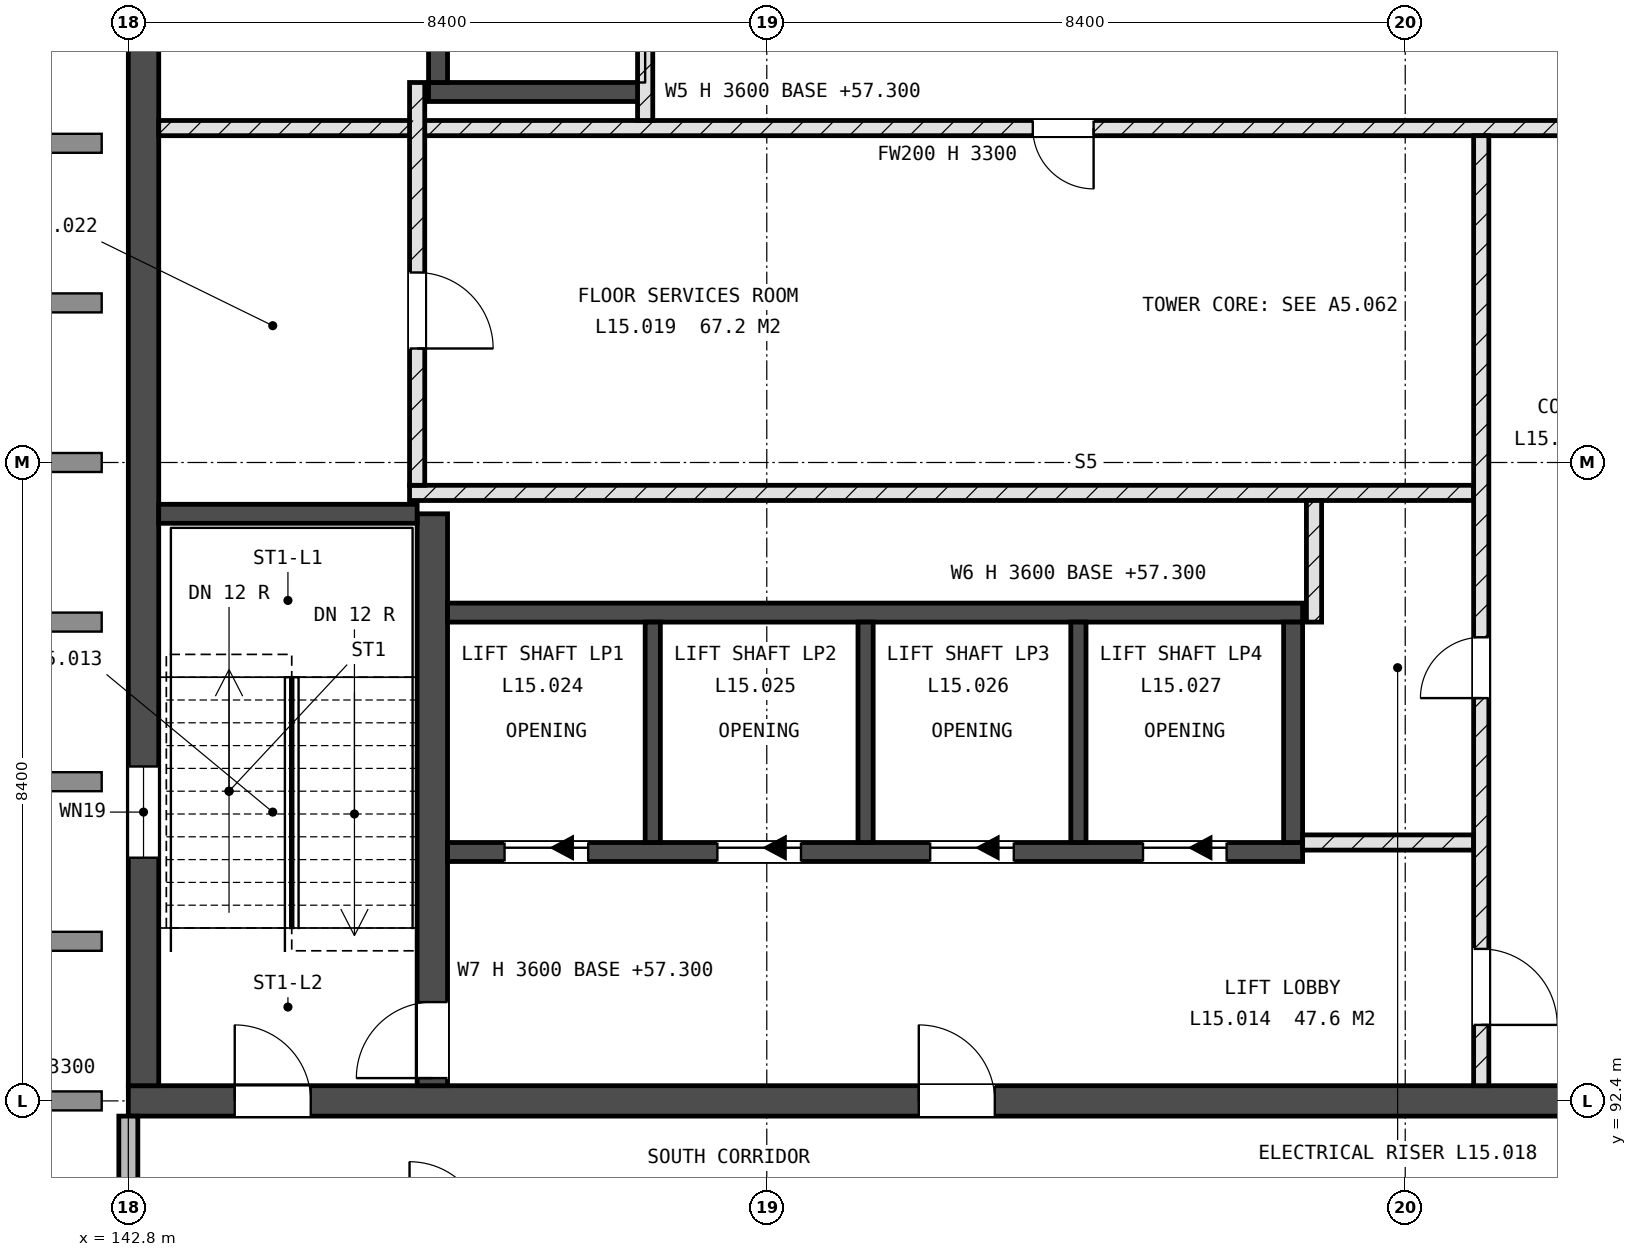
"""IFC4 building model, lengths in metres.
Left out: names, types, materials, properties, quantities, classifications, styles, units other than length and angle.
Written with IfcOpenShell. Run it as: python <this file> out.ifc"""

import sys

from ifc_helpers import new_model, si_unit, direction, frame, frame_2d, origin, place, context, subcontext, project, spatial, rectangle, extrude, element, fill, save


model = new_model("IFC4")
c1 = context("Model", 3, precision=1e-05, world=origin(), true_north=direction((0.0, 1.0)))
c2 = subcontext(c1, "Body", "Model", "MODEL_VIEW")
j1 = project(units=[si_unit("LENGTHUNIT", "METRE"), si_unit("PLANEANGLEUNIT", "RADIAN")], contexts=[c1])
p1 = place(None, origin())
s1 = spatial("IfcSite", under=j1, at=p1, CompositionType="ELEMENT")
p2 = place(p1, origin())
s2 = spatial("IfcBuilding", under=s1, at=p2, CompositionType="ELEMENT")
p3 = place(p2, frame((0.0, 0.0, 57.6)))
s3 = spatial("IfcBuildingStorey", under=s2, at=p3, CompositionType="ELEMENT", Elevation=57.6)
p4 = place(p3, frame((142.8, 92.4, -0.3), z_axis=(0.0, 0.0, 1.0), x_axis=(1.0, 0.0, 0.0)))
e1 = element("IfcWall", 1, at=p4, inside=s3, PredefinedType="SHEAR", context=c2, shape_type="SweptSolid", body=[
    extrude(rectangle(XDim=25.2, YDim=0.4, at=frame_2d((12.6, 0.0))), origin(), (0.0, 0.0, 1.0), 3.6),
])
p5 = place(p4, frame((1.4, 0.0, 0.3)))
e2 = element("IfcOpeningElement", 2, at=p5, cuts=e1, PredefinedType="OPENING", context=c2, shape_type="SweptSolid", body=[
    extrude(rectangle(XDim=1.0, YDim=2.1, at=frame_2d((0.5, 1.05))), frame((0.0, 0.21, 0.0), z_axis=(0.0, -1.0, 0.0), x_axis=(1.0, 0.0, 0.0)), (0.0, 0.0, 1.0), 0.42),
])
p6 = place(p4, frame((19.1, 0.0, 0.3)))
e3 = element("IfcOpeningElement", 3, at=p6, cuts=e1, PredefinedType="OPENING", context=c2, shape_type="SweptSolid", body=[
    extrude(rectangle(XDim=1.0, YDim=2.1, at=frame_2d((0.5, 1.05))), frame((0.0, 0.21, 0.0), z_axis=(0.0, -1.0, 0.0), x_axis=(1.0, 0.0, 0.0)), (0.0, 0.0, 1.0), 0.42),
])
p7 = place(p4, frame((10.4, 0.0, 0.3)))
e4 = element("IfcOpeningElement", 4, at=p7, cuts=e1, PredefinedType="OPENING", context=c2, shape_type="SweptSolid", body=[
    extrude(rectangle(XDim=1.0, YDim=2.1, at=frame_2d((0.5, 1.05))), frame((0.0, 0.21, 0.0), z_axis=(0.0, -1.0, 0.0), x_axis=(1.0, 0.0, 0.0)), (0.0, 0.0, 1.0), 0.42),
])
p8 = place(p3, frame((143.0, 92.6, -0.3), z_axis=(0.0, 0.0, 1.0), x_axis=(0.0, 1.0, 0.0)))
e5 = element("IfcWall", 5, at=p8, inside=s3, PredefinedType="SHEAR", context=c2, shape_type="SweptSolid", body=[
    extrude(rectangle(XDim=16.4, YDim=0.4, at=frame_2d((8.2, 0.0))), origin(), (0.0, 0.0, 1.0), 3.6),
])
p9 = place(p8, frame((3.0, 0.0, 1.9)))
e6 = element("IfcOpeningElement", 6, at=p9, cuts=e5, PredefinedType="OPENING", context=c2, shape_type="SweptSolid", body=[
    extrude(rectangle(XDim=1.2, YDim=0.9, at=frame_2d((0.6, 0.45))), frame((0.0, 0.21, 0.0), z_axis=(0.0, -1.0, 0.0), x_axis=(1.0, 0.0, 0.0)), (0.0, 0.0, 1.0), 0.42),
])
p10 = place(p3, frame((146.8, 92.6, -0.3), z_axis=(0.0, 0.0, 1.0), x_axis=(0.0, 1.0, 0.0)))
e7 = element("IfcWall", 7, at=p10, inside=s3, PredefinedType="SHEAR", context=c2, shape_type="SweptSolid", body=[
    extrude(rectangle(XDim=7.525, YDim=0.4, at=frame_2d((3.762, 0.0))), origin(), (0.0, 0.0, 1.0), 3.6),
])
p11 = place(p10, frame((0.1, 0.0, 0.3)))
e8 = element("IfcOpeningElement", 8, at=p11, cuts=e7, PredefinedType="OPENING", context=c2, shape_type="SweptSolid", body=[
    extrude(rectangle(XDim=1.0, YDim=2.1, at=frame_2d((0.5, 1.05))), frame((0.0, 0.21, 0.0), z_axis=(0.0, -1.0, 0.0), x_axis=(1.0, 0.0, 0.0)), (0.0, 0.0, 1.0), 0.42),
])
p12 = place(p3, frame((143.2, 100.125, -0.3), z_axis=(0.0, 0.0, 1.0), x_axis=(1.0, 0.0, 0.0)))
e9 = element("IfcWall", 9, at=p12, inside=s3, PredefinedType="SHEAR", context=c2, shape_type="SweptSolid", body=[
    extrude(rectangle(XDim=3.4, YDim=0.25, at=frame_2d((1.7, 0.0))), origin(), (0.0, 0.0, 1.0), 3.6),
])
p13 = place(p3, frame((147.0, 95.675, -0.3), z_axis=(0.0, 0.0, 1.0), x_axis=(1.0, 0.0, 0.0)))
e10 = element("IfcWall", 10, at=p13, inside=s3, PredefinedType="SHEAR", context=c2, shape_type="SweptSolid", body=[
    extrude(rectangle(XDim=11.25, YDim=0.25, at=frame_2d((5.625, 0.0))), origin(), (0.0, 0.0, 1.0), 3.6),
])
p14 = place(p13, frame((0.75, 0.0, 0.3)))
e11 = element("IfcOpeningElement", 11, at=p14, cuts=e10, PredefinedType="OPENING", context=c2, shape_type="SweptSolid", body=[
    extrude(rectangle(XDim=1.1, YDim=2.1, at=frame_2d((0.55, 1.05))), frame((0.0, 0.135, 0.0), z_axis=(0.0, -1.0, 0.0), x_axis=(1.0, 0.0, 0.0)), (0.0, 0.0, 1.0), 0.27),
])
p15 = place(p13, frame((3.55, 0.0, 0.3)))
e12 = element("IfcOpeningElement", 12, at=p15, cuts=e10, PredefinedType="OPENING", context=c2, shape_type="SweptSolid", body=[
    extrude(rectangle(XDim=1.1, YDim=2.1, at=frame_2d((0.55, 1.05))), frame((0.0, 0.135, 0.0), z_axis=(0.0, -1.0, 0.0), x_axis=(1.0, 0.0, 0.0)), (0.0, 0.0, 1.0), 0.27),
])
p16 = place(p13, frame((6.35, 0.0, 0.3)))
e13 = element("IfcOpeningElement", 13, at=p16, cuts=e10, PredefinedType="OPENING", context=c2, shape_type="SweptSolid", body=[
    extrude(rectangle(XDim=1.1, YDim=2.1, at=frame_2d((0.55, 1.05))), frame((0.0, 0.135, 0.0), z_axis=(0.0, -1.0, 0.0), x_axis=(1.0, 0.0, 0.0)), (0.0, 0.0, 1.0), 0.27),
])
p17 = place(p13, frame((9.15, 0.0, 0.3)))
e14 = element("IfcOpeningElement", 14, at=p17, cuts=e10, PredefinedType="OPENING", context=c2, shape_type="SweptSolid", body=[
    extrude(rectangle(XDim=1.1, YDim=2.1, at=frame_2d((0.55, 1.05))), frame((0.0, 0.135, 0.0), z_axis=(0.0, -1.0, 0.0), x_axis=(1.0, 0.0, 0.0)), (0.0, 0.0, 1.0), 0.27),
])
p18 = place(p3, frame((147.0, 98.825, -0.3), z_axis=(0.0, 0.0, 1.0), x_axis=(1.0, 0.0, 0.0)))
e15 = element("IfcWall", 15, at=p18, inside=s3, PredefinedType="SHEAR", context=c2, shape_type="SweptSolid", body=[
    extrude(rectangle(XDim=11.25, YDim=0.25, at=frame_2d((5.625, 0.0))), origin(), (0.0, 0.0, 1.0), 3.6),
])
p19 = place(p3, frame((158.125, 95.8, -0.3), z_axis=(0.0, 0.0, 1.0), x_axis=(0.0, 1.0, 0.0)))
e16 = element("IfcWall", 16, at=p19, inside=s3, PredefinedType="SHEAR", context=c2, shape_type="SweptSolid", body=[
    extrude(rectangle(XDim=2.9, YDim=0.25, at=frame_2d((1.45, 0.0))), origin(), (0.0, 0.0, 1.0), 3.6),
])
for number, where, z_axis, x_axis in (
    (17, (149.7, 95.8, -0.3), (0.0, 0.0, 1.0), (0.0, 1.0, 0.0)),
    (18, (152.5, 95.8, -0.3), (0.0, 0.0, 1.0), (0.0, 1.0, 0.0)),
    (19, (155.3, 95.8, -0.3), (0.0, 0.0, 1.0), (0.0, 1.0, 0.0)),
):
    element("IfcWall", number, at=place(p3, frame(where, z_axis=z_axis, x_axis=x_axis)), inside=s3, PredefinedType="SHEAR", context=c2, shape_type="SweptSolid", body=[
        extrude(rectangle(XDim=2.9, YDim=0.2, at=frame_2d((1.45, 0.0))), origin(), (0.0, 0.0, 1.0), 3.6),
    ])
p20 = place(p3, frame((146.75, 105.675, -0.3), z_axis=(0.0, 0.0, 1.0), x_axis=(1.0, 0.0, 0.0)))
e20 = element("IfcWall", 20, at=p20, inside=s3, PredefinedType="SHEAR", context=c2, shape_type="SweptSolid", body=[
    extrude(rectangle(XDim=2.85, YDim=0.25, at=frame_2d((1.425, 0.0))), origin(), (0.0, 0.0, 1.0), 3.6),
])
p21 = place(p3, frame((146.875, 105.8, -0.3), z_axis=(0.0, 0.0, 1.0), x_axis=(0.0, 1.0, 0.0)))
e21 = element("IfcWall", 21, at=p21, inside=s3, PredefinedType="SHEAR", context=c2, shape_type="SweptSolid", body=[
    extrude(rectangle(XDim=2.9, YDim=0.25, at=frame_2d((1.45, 0.0))), origin(), (0.0, 0.0, 1.0), 3.6),
])
p22 = place(p3, frame((142.8, 84.35, 0.0), z_axis=(0.0, 0.0, 1.0), x_axis=(0.0, 1.0, 0.0)))
e22 = element("IfcWall", 22, at=p22, inside=s3, PredefinedType="STANDARD", context=c2, shape_type="SweptSolid", body=[
    extrude(rectangle(XDim=7.85, YDim=0.25, at=frame_2d((3.925, 0.0))), origin(), (0.0, 0.0, 1.0), 3.3),
])
p23 = place(p22, frame((2.35, 0.0, 2.1)))
e23 = element("IfcOpeningElement", 23, at=p23, cuts=e22, PredefinedType="OPENING", context=c2, shape_type="SweptSolid", body=[
    extrude(rectangle(XDim=0.9, YDim=0.6, at=frame_2d((0.45, 0.3))), frame((0.0, 0.135, 0.0), z_axis=(0.0, -1.0, 0.0), x_axis=(1.0, 0.0, 0.0)), (0.0, 0.0, 1.0), 0.27),
])
p24 = place(p3, frame((158.25, 95.8, 0.0), z_axis=(0.0, 0.0, 1.0), x_axis=(1.0, 0.0, 0.0)))
e24 = element("IfcWall", 24, at=p24, inside=s3, PredefinedType="SOLIDWALL", context=c2, shape_type="SweptSolid", body=[
    extrude(rectangle(XDim=2.25, YDim=0.2, at=frame_2d((1.125, 0.0))), origin(), (0.0, 0.0, 1.0), 3.3),
])
p25 = place(p3, frame((146.5, 100.4, 0.0), z_axis=(0.0, 0.0, 1.0), x_axis=(1.0, 0.0, 0.0)))
e25 = element("IfcWall", 25, at=p25, inside=s3, PredefinedType="SOLIDWALL", context=c2, shape_type="SweptSolid", body=[
    extrude(rectangle(XDim=14.0, YDim=0.2, at=frame_2d((7.0, 0.0))), origin(), (0.0, 0.0, 1.0), 3.3),
])
p26 = place(p3, frame((143.2, 105.2, 0.0), z_axis=(0.0, 0.0, 1.0), x_axis=(1.0, 0.0, 0.0)))
e26 = element("IfcWall", 26, at=p26, inside=s3, PredefinedType="SOLIDWALL", context=c2, shape_type="SweptSolid", body=[
    extrude(rectangle(XDim=20.75, YDim=0.2, at=frame_2d((10.375, 0.0))), origin(), (0.0, 0.0, 1.0), 3.3),
])
p27 = place(p26, frame((11.5, 0.0, 0.0)))
e27 = element("IfcOpeningElement", 27, at=p27, cuts=e26, PredefinedType="OPENING", context=c2, shape_type="SweptSolid", body=[
    extrude(rectangle(XDim=0.8, YDim=2.1, at=frame_2d((0.4, 1.05))), frame((0.0, 0.11, 0.0), z_axis=(0.0, -1.0, 0.0), x_axis=(1.0, 0.0, 0.0)), (0.0, 0.0, 1.0), 0.22),
])
p28 = place(p26, frame((18.8, 0.0, 0.0)))
e28 = element("IfcOpeningElement", 28, at=p28, cuts=e26, PredefinedType="OPENING", context=c2, shape_type="SweptSolid", body=[
    extrude(rectangle(XDim=1.0, YDim=2.1, at=frame_2d((0.5, 1.05))), frame((0.0, 0.11, 0.0), z_axis=(0.0, -1.0, 0.0), x_axis=(1.0, 0.0, 0.0)), (0.0, 0.0, 1.0), 0.22),
])
p29 = place(p3, frame((146.6, 100.5, 0.0), z_axis=(0.0, 0.0, 1.0), x_axis=(0.0, 1.0, 0.0)))
e29 = element("IfcWall", 29, at=p29, inside=s3, PredefinedType="SOLIDWALL", context=c2, shape_type="SweptSolid", body=[
    extrude(rectangle(XDim=5.3, YDim=0.2, at=frame_2d((2.65, 0.0))), origin(), (0.0, 0.0, 1.0), 3.3),
])
p30 = place(p29, frame((1.8, 0.0, 0.0)))
e30 = element("IfcOpeningElement", 30, at=p30, cuts=e29, PredefinedType="OPENING", context=c2, shape_type="SweptSolid", body=[
    extrude(rectangle(XDim=1.0, YDim=2.1, at=frame_2d((0.5, 1.05))), frame((0.0, 0.11, 0.0), z_axis=(0.0, -1.0, 0.0), x_axis=(1.0, 0.0, 0.0)), (0.0, 0.0, 1.0), 0.22),
])
p31 = place(p3, frame((149.6, 105.3, 0.0), z_axis=(0.0, 0.0, 1.0), x_axis=(0.0, 1.0, 0.0)))
e31 = element("IfcWall", 31, at=p31, inside=s3, PredefinedType="SOLIDWALL", context=c2, shape_type="SweptSolid", body=[
    extrude(rectangle(XDim=3.7, YDim=0.2, at=frame_2d((1.85, 0.0))), origin(), (0.0, 0.0, 1.0), 3.3),
])
p32 = place(p31, frame((1.4, 0.0, 0.0)))
e32 = element("IfcOpeningElement", 32, at=p32, cuts=e31, PredefinedType="OPENING", context=c2, shape_type="SweptSolid", body=[
    extrude(rectangle(XDim=1.1, YDim=2.1, at=frame_2d((0.55, 1.05))), frame((0.0, 0.11, 0.0), z_axis=(0.0, -1.0, 0.0), x_axis=(1.0, 0.0, 0.0)), (0.0, 0.0, 1.0), 0.22),
])
p33 = place(p3, frame((158.4, 98.7, 0.0), z_axis=(0.0, 0.0, 1.0), x_axis=(0.0, 1.0, 0.0)))
e33 = element("IfcWall", 33, at=p33, inside=s3, PredefinedType="SOLIDWALL", context=c2, shape_type="SweptSolid", body=[
    extrude(rectangle(XDim=1.6, YDim=0.2, at=frame_2d((0.8, 0.0))), origin(), (0.0, 0.0, 1.0), 3.3),
])
p34 = place(p3, frame((160.6, 92.6, 0.0), z_axis=(0.0, 0.0, 1.0), x_axis=(0.0, 1.0, 0.0)))
e34 = element("IfcWall", 34, at=p34, inside=s3, PredefinedType="SOLIDWALL", context=c2, shape_type="SweptSolid", body=[
    extrude(rectangle(XDim=12.5, YDim=0.2, at=frame_2d((6.25, 0.0))), origin(), (0.0, 0.0, 1.0), 3.3),
])
p35 = place(p34, frame((5.1, 0.0, 0.0)))
e35 = element("IfcOpeningElement", 35, at=p35, cuts=e34, PredefinedType="OPENING", context=c2, shape_type="SweptSolid", body=[
    extrude(rectangle(XDim=0.8, YDim=2.1, at=frame_2d((0.4, 1.05))), frame((0.0, 0.11, 0.0), z_axis=(0.0, -1.0, 0.0), x_axis=(1.0, 0.0, 0.0)), (0.0, 0.0, 1.0), 0.22),
])
p36 = place(p34, frame((0.8, 0.0, 0.0)))
e36 = element("IfcOpeningElement", 36, at=p36, cuts=e34, PredefinedType="OPENING", context=c2, shape_type="SweptSolid", body=[
    extrude(rectangle(XDim=1.0, YDim=2.1, at=frame_2d((0.5, 1.05))), frame((0.0, 0.11, 0.0), z_axis=(0.0, -1.0, 0.0), x_axis=(1.0, 0.0, 0.0)), (0.0, 0.0, 1.0), 0.22),
])
p37 = place(p9, origin())
e37 = element("IfcWindow", 37, at=p37, inside=s3, PartitioningType="SINGLE_PANEL", PredefinedType="WINDOW", context=c2, shape_type="SweptSolid", body=[
    extrude(rectangle(XDim=1.2, YDim=0.9, at=frame_2d((0.6, 0.45))), frame((0.0, 0.03, 0.0), z_axis=(0.0, -1.0, 0.0), x_axis=(1.0, 0.0, 0.0)), (0.0, 0.0, 1.0), 0.06),
])
fill(e6, e37)
p38 = place(p14, origin())
e38 = element("IfcDoor", 38, at=p38, inside=s3, OperationType="SLIDING_TO_LEFT", PredefinedType="DOOR", context=c2, shape_type="SweptSolid", body=[
    extrude(rectangle(XDim=1.1, YDim=2.1, at=frame_2d((0.55, 1.05))), frame((0.0, 0.025, 0.0), z_axis=(0.0, -1.0, 0.0), x_axis=(1.0, 0.0, 0.0)), (0.0, 0.0, 1.0), 0.05),
])
fill(e11, e38)
p39 = place(p15, origin())
e39 = element("IfcDoor", 39, at=p39, inside=s3, OperationType="SLIDING_TO_LEFT", PredefinedType="DOOR", context=c2, shape_type="SweptSolid", body=[
    extrude(rectangle(XDim=1.1, YDim=2.1, at=frame_2d((0.55, 1.05))), frame((0.0, 0.025, 0.0), z_axis=(0.0, -1.0, 0.0), x_axis=(1.0, 0.0, 0.0)), (0.0, 0.0, 1.0), 0.05),
])
fill(e12, e39)
p40 = place(p16, origin())
e40 = element("IfcDoor", 40, at=p40, inside=s3, OperationType="SLIDING_TO_LEFT", PredefinedType="DOOR", context=c2, shape_type="SweptSolid", body=[
    extrude(rectangle(XDim=1.1, YDim=2.1, at=frame_2d((0.55, 1.05))), frame((0.0, 0.025, 0.0), z_axis=(0.0, -1.0, 0.0), x_axis=(1.0, 0.0, 0.0)), (0.0, 0.0, 1.0), 0.05),
])
fill(e13, e40)
p41 = place(p17, origin())
e41 = element("IfcDoor", 41, at=p41, inside=s3, OperationType="SLIDING_TO_LEFT", PredefinedType="DOOR", context=c2, shape_type="SweptSolid", body=[
    extrude(rectangle(XDim=1.1, YDim=2.1, at=frame_2d((0.55, 1.05))), frame((0.0, 0.025, 0.0), z_axis=(0.0, -1.0, 0.0), x_axis=(1.0, 0.0, 0.0)), (0.0, 0.0, 1.0), 0.05),
])
fill(e14, e41)
p42 = place(p5, origin())
e42 = element("IfcDoor", 42, at=p42, inside=s3, OperationType="SINGLE_SWING_RIGHT", PredefinedType="DOOR", context=c2, shape_type="SweptSolid", body=[
    extrude(rectangle(XDim=1.0, YDim=2.1, at=frame_2d((0.5, 1.05))), frame((0.0, 0.025, 0.0), z_axis=(0.0, -1.0, 0.0), x_axis=(1.0, 0.0, 0.0)), (0.0, 0.0, 1.0), 0.05),
])
fill(e2, e42)
p43 = place(p11, origin())
e43 = element("IfcDoor", 43, at=p43, inside=s3, OperationType="SINGLE_SWING_RIGHT", PredefinedType="DOOR", context=c2, shape_type="SweptSolid", body=[
    extrude(rectangle(XDim=1.0, YDim=2.1, at=frame_2d((0.5, 1.05))), frame((0.0, 0.025, 0.0), z_axis=(0.0, -1.0, 0.0), x_axis=(1.0, 0.0, 0.0)), (0.0, 0.0, 1.0), 0.05),
])
fill(e8, e43)
p44 = place(p35, origin())
e44 = element("IfcDoor", 44, at=p44, inside=s3, OperationType="SINGLE_SWING_RIGHT", PredefinedType="DOOR", context=c2, shape_type="SweptSolid", body=[
    extrude(rectangle(XDim=0.8, YDim=2.1, at=frame_2d((0.4, 1.05))), frame((0.0, 0.025, 0.0), z_axis=(0.0, -1.0, 0.0), x_axis=(1.0, 0.0, 0.0)), (0.0, 0.0, 1.0), 0.05),
])
fill(e35, e44)
p45 = place(p27, origin())
e45 = element("IfcDoor", 45, at=p45, inside=s3, OperationType="SINGLE_SWING_RIGHT", PredefinedType="DOOR", context=c2, shape_type="SweptSolid", body=[
    extrude(rectangle(XDim=0.8, YDim=2.1, at=frame_2d((0.4, 1.05))), frame((0.0, 0.025, 0.0), z_axis=(0.0, -1.0, 0.0), x_axis=(1.0, 0.0, 0.0)), (0.0, 0.0, 1.0), 0.05),
])
fill(e27, e45)
p46 = place(p30, origin())
e46 = element("IfcDoor", 46, at=p46, inside=s3, OperationType="SINGLE_SWING_LEFT", PredefinedType="DOOR", context=c2, shape_type="SweptSolid", body=[
    extrude(rectangle(XDim=1.0, YDim=2.1, at=frame_2d((0.5, 1.05))), frame((0.0, 0.025, 0.0), z_axis=(0.0, -1.0, 0.0), x_axis=(1.0, 0.0, 0.0)), (0.0, 0.0, 1.0), 0.05),
])
fill(e30, e46)
p47 = place(p7, origin())
e47 = element("IfcDoor", 47, at=p47, inside=s3, OperationType="SINGLE_SWING_RIGHT", PredefinedType="DOOR", context=c2, shape_type="SweptSolid", body=[
    extrude(rectangle(XDim=1.0, YDim=2.1, at=frame_2d((0.5, 1.05))), frame((0.0, 0.025, 0.0), z_axis=(0.0, -1.0, 0.0), x_axis=(1.0, 0.0, 0.0)), (0.0, 0.0, 1.0), 0.05),
])
fill(e4, e47)
p48 = place(p36, origin())
e48 = element("IfcDoor", 48, at=p48, inside=s3, OperationType="SINGLE_SWING_LEFT", PredefinedType="DOOR", context=c2, shape_type="SweptSolid", body=[
    extrude(rectangle(XDim=1.0, YDim=2.1, at=frame_2d((0.5, 1.05))), frame((0.0, 0.025, 0.0), z_axis=(0.0, -1.0, 0.0), x_axis=(1.0, 0.0, 0.0)), (0.0, 0.0, 1.0), 0.05),
])
fill(e36, e48)
save(model, sys.argv[1])
